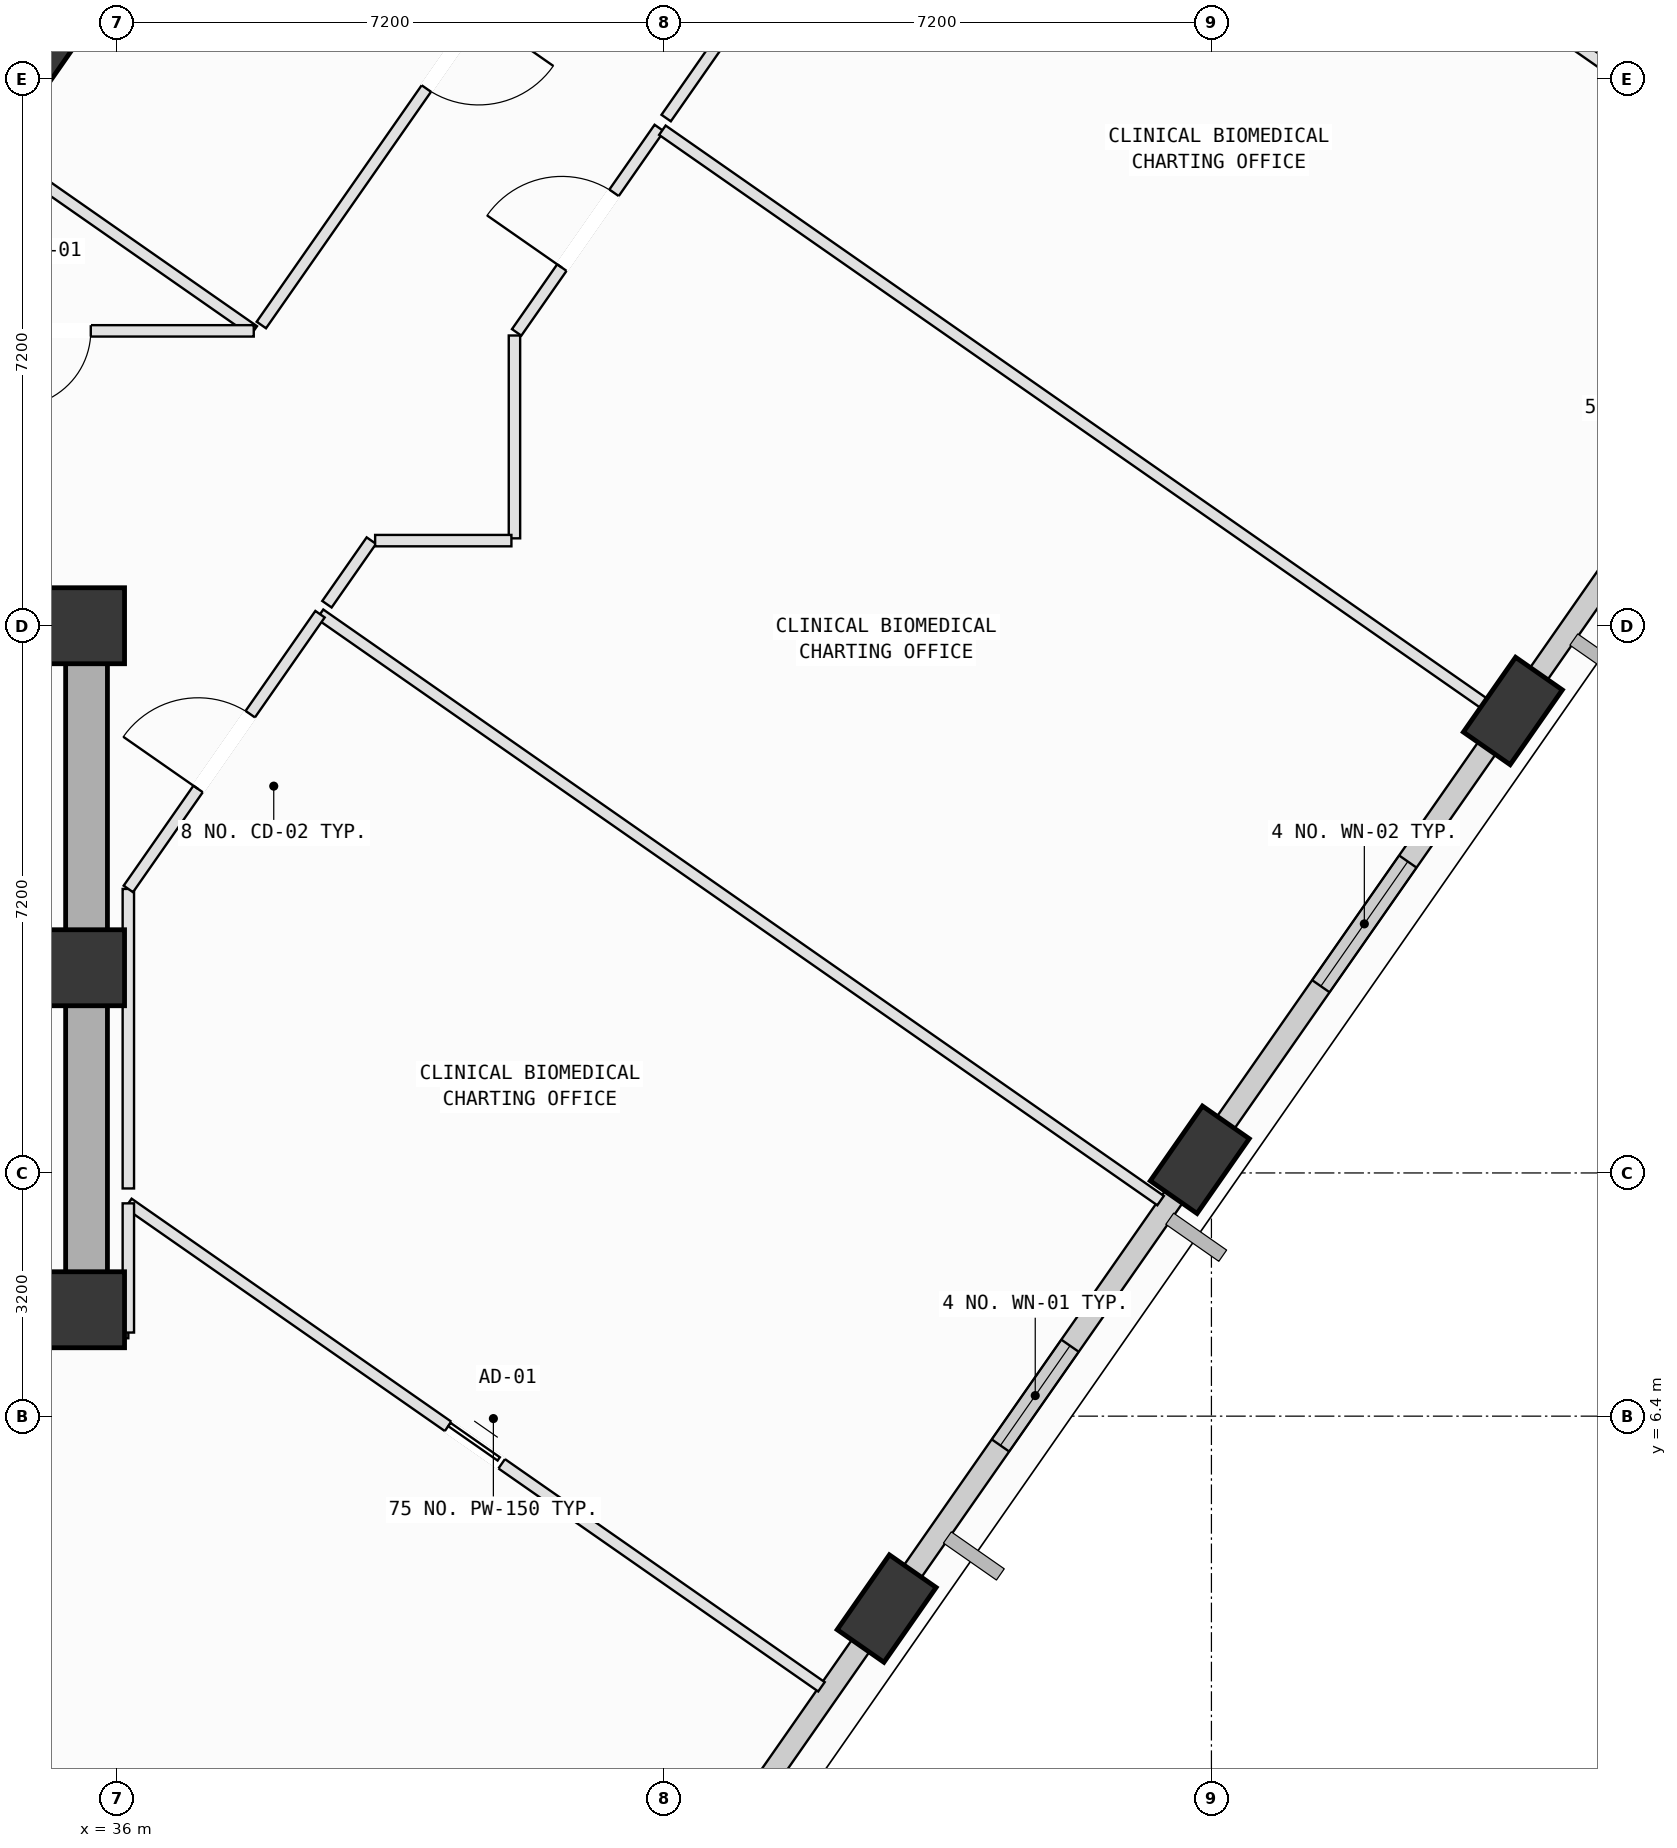
"""IFC4 building model, lengths in metres.
Left out: names, types, materials, properties, quantities, classifications, styles, units other than length and angle.
Written with IfcOpenShell. Run it as: python <this file> out.ifc"""

import sys

from ifc_helpers import new_model, si_unit, direction, frame, frame_2d, origin, origin_2d, place, context, subcontext, project, spatial, rectangle, extrude, element, fill, save


model = new_model("IFC4")
c1 = context("Model", 3, precision=1e-05, world=origin(), true_north=direction((0.0, 1.0)))
c2 = subcontext(c1, "Body", "Model", "MODEL_VIEW")
j1 = project(units=[si_unit("LENGTHUNIT", "METRE"), si_unit("PLANEANGLEUNIT", "RADIAN")], contexts=[c1])
p1 = place(None, origin())
s1 = spatial("IfcSite", under=j1, at=p1, CompositionType="ELEMENT")
p2 = place(p1, origin())
s2 = spatial("IfcBuilding", under=s1, at=p2, CompositionType="ELEMENT")
p3 = place(p2, frame((0.0, 0.0, 259.2)))
s3 = spatial("IfcBuildingStorey", under=s2, at=p3, CompositionType="ELEMENT", Elevation=259.2)
for number, where, z_axis, x_axis in (
    (1, (35.6, 7.8, 0.0), (0.0, 0.0, 1.0), (1.0, 0.0, 0.0)),
    (2, (35.6, 12.3, 0.0), (0.0, 0.0, 1.0), (1.0, 0.0, 0.0)),
    (3, (35.6, 16.8, 0.0), (0.0, 0.0, 1.0), (1.0, 0.0, 0.0)),
):
    element("IfcColumn", number, at=place(p3, frame(where, z_axis=z_axis, x_axis=x_axis)), inside=s3, PredefinedType="COLUMN", context=c2, shape_type="SweptSolid", body=[
        extrude(rectangle(XDim=1.0, YDim=1.0, at=origin_2d()), origin(), (0.0, 0.0, 1.0), 4.0),
    ])
p4 = place(p3, frame((46.127, 3.868, 0.002), z_axis=(0.085884033483, 0.052332733779, 0.994929755193), x_axis=(-0.9945362428, 0.063984080807, 0.082484538915)))
e4 = element("IfcColumn", 4, at=p4, inside=s3, PredefinedType="COLUMN", context=c2, shape_type="SweptSolid", body=[
    extrude(rectangle(XDim=1.2, YDim=0.75, at=origin_2d()), origin(), (0.0, 0.0, 1.0), 4.017),
])
p5 = place(p3, frame((50.247, 9.773, 0.002), z_axis=(0.061437147867, 0.069223241854, 0.995707597465), x_axis=(-0.969991349741, -0.230986175775, 0.075908945645)))
e5 = element("IfcColumn", 5, at=p5, inside=s3, PredefinedType="COLUMN", context=c2, shape_type="SweptSolid", body=[
    extrude(rectangle(XDim=1.2, YDim=0.75, at=origin_2d()), origin(), (0.0, 0.0, 1.0), 4.014),
])
p6 = place(p3, frame((54.366, 15.678, 0.002), z_axis=(0.03691932488, 0.086063994572, 0.995605319536), x_axis=(-0.847717972031, -0.524857195054, 0.076806019917)))
e6 = element("IfcColumn", 6, at=p6, inside=s3, PredefinedType="COLUMN", context=c2, shape_type="SweptSolid", body=[
    extrude(rectangle(XDim=1.2, YDim=0.75, at=origin_2d()), origin(), (0.0, 0.0, 1.0), 4.014),
])
p7 = place(p3, frame((34.936, 24.356, 0.002), z_axis=(0.001832701206, 0.005559193659, 0.999982868139), x_axis=(-0.800160526924, -0.599766691213, 0.004800756595)))
e7 = element("IfcColumn", 7, at=p7, inside=s3, PredefinedType="COLUMN", context=c2, shape_type="SweptSolid", body=[
    extrude(rectangle(XDim=1.2, YDim=0.75, at=origin_2d()), origin(), (0.0, 0.0, 1.0), 3.996),
])
p8 = place(p3, frame((46.01, 3.701, 0.0), z_axis=(0.0, 0.0, 1.0), x_axis=(-0.572138298293, -0.820157160321, 0.0)))
e8 = element("IfcWall", 8, at=p8, inside=s3, PredefinedType="SOLIDWALL", context=c2, shape_type="SweptSolid", body=[
    extrude(rectangle(XDim=6.439, YDim=0.28, at=frame_2d((3.219, 0.0))), origin(), (0.0, 0.0, 1.0), 3.265),
])
p9 = place(p8, frame((3.283, 0.0, 0.75)))
e9 = element("IfcOpeningElement", 9, at=p9, cuts=e8, PredefinedType="OPENING", context=c2, shape_type="SweptSolid", body=[
    extrude(rectangle(XDim=1.2, YDim=1.75, at=frame_2d((0.6, 0.875))), frame((0.0, 0.15, 0.0), z_axis=(0.0, -1.0, 0.0), x_axis=(1.0, 0.0, 0.0)), (0.0, 0.0, 1.0), 0.3),
])
p10 = place(p3, frame((50.125, 9.599, 0.0), z_axis=(0.0, 0.0, 1.0), x_axis=(-0.572145868794, -0.820151879119, 0.0)))
e10 = element("IfcWall", 10, at=p10, inside=s3, PredefinedType="SOLIDWALL", context=c2, shape_type="SweptSolid", body=[
    extrude(rectangle(XDim=6.414, YDim=0.28, at=frame_2d((3.207, 0.0))), origin(), (0.0, 0.0, 1.0), 3.265),
])
p11 = place(p10, frame((2.771, 0.0, 0.75)))
e11 = element("IfcOpeningElement", 11, at=p11, cuts=e10, PredefinedType="OPENING", context=c2, shape_type="SweptSolid", body=[
    extrude(rectangle(XDim=1.6, YDim=1.95, at=frame_2d((0.8, 0.975))), frame((0.0, 0.15, 0.0), z_axis=(0.0, -1.0, 0.0), x_axis=(1.0, 0.0, 0.0)), (0.0, 0.0, 1.0), 0.3),
])
p12 = place(p3, frame((54.245, 15.505, 0.0), z_axis=(0.0, 0.0, 1.0), x_axis=(-0.572154773517, -0.820145667026, 0.0)))
e12 = element("IfcWall", 12, at=p12, inside=s3, PredefinedType="SOLIDWALL", context=c2, shape_type="SweptSolid", body=[
    extrude(rectangle(XDim=6.407, YDim=0.28, at=frame_2d((3.204, 0.0))), origin(), (0.0, 0.0, 1.0), 3.265),
])
p13 = place(p12, frame((2.204, 0.0, 0.75)))
e13 = element("IfcOpeningElement", 13, at=p13, cuts=e12, PredefinedType="OPENING", context=c2, shape_type="SweptSolid", body=[
    extrude(rectangle(XDim=2.0, YDim=1.95, at=frame_2d((1.0, 0.975))), frame((0.0, 0.15, 0.0), z_axis=(0.0, -1.0, 0.0), x_axis=(1.0, 0.0, 0.0)), (0.0, 0.0, 1.0), 0.3),
])
p14 = place(p3, frame((58.37, 21.418, 0.0), z_axis=(0.0, 0.0, 1.0), x_axis=(-0.572149467016, -0.820149368953, 0.0)))
e14 = element("IfcWall", 14, at=p14, inside=s3, PredefinedType="SOLIDWALL", context=c2, shape_type="SweptSolid", body=[
    extrude(rectangle(XDim=6.418, YDim=0.28, at=frame_2d((3.209, 0.0))), origin(), (0.0, 0.0, 1.0), 3.265),
])
p15 = place(p14, frame((2.512, 0.0, 0.75)))
e15 = element("IfcOpeningElement", 15, at=p15, cuts=e14, PredefinedType="OPENING", context=c2, shape_type="SweptSolid", body=[
    extrude(rectangle(XDim=1.4, YDim=1.85, at=frame_2d((0.7, 0.925))), frame((0.0, 0.15, 0.0), z_axis=(0.0, -1.0, 0.0), x_axis=(1.0, 0.0, 0.0)), (0.0, 0.0, 1.0), 0.3),
])
p16 = place(p14, frame((0.494, 0.0, 0.75)))
e16 = element("IfcOpeningElement", 16, at=p16, cuts=e14, PredefinedType="OPENING", context=c2, shape_type="SweptSolid", body=[
    extrude(rectangle(XDim=1.4, YDim=1.85, at=frame_2d((0.7, 0.925))), frame((0.0, 0.15, 0.0), z_axis=(0.0, -1.0, 0.0), x_axis=(1.0, 0.0, 0.0)), (0.0, 0.0, 1.0), 0.3),
])
p17 = place(p3, frame((24.8, 7.8, 0.0), z_axis=(0.0, 0.0, 1.0), x_axis=(1.0, 0.0, 0.0)))
e17 = element("IfcWall", 17, at=p17, inside=s3, PredefinedType="SHEAR", context=c2, shape_type="SweptSolid", body=[
    extrude(rectangle(XDim=10.8, YDim=0.55, at=frame_2d((5.4, 0.0))), origin(), (0.0, 0.0, 1.0), 3.78),
])
p18 = place(p3, frame((35.6, 7.8, 0.0), z_axis=(0.0, 0.0, 1.0), x_axis=(0.0, 1.0, 0.0)))
e18 = element("IfcWall", 18, at=p18, inside=s3, PredefinedType="SHEAR", context=c2, shape_type="SweptSolid", body=[
    extrude(rectangle(XDim=9.0, YDim=0.55, at=frame_2d((4.5, 0.0))), origin(), (0.0, 0.0, 1.0), 3.78),
])
p19 = place(p3, frame((36.15, 9.2, 0.0), z_axis=(0.0, 0.0, 1.0), x_axis=(0.820183982528, -0.572099846883, 0.0)))
e19 = element("IfcWall", 19, at=p19, inside=s3, PredefinedType="PARTITIONING", context=c2, shape_type="SweptSolid", body=[
    extrude(rectangle(XDim=11.118, YDim=0.15, at=frame_2d((5.559, 0.0))), origin(), (0.0, 0.0, 1.0), 3.165),
])
p20 = place(p19, frame((5.129, 0.0, 0.0)))
e20 = element("IfcOpeningElement", 20, at=p20, cuts=e19, PredefinedType="OPENING", context=c2, shape_type="SweptSolid", body=[
    extrude(rectangle(XDim=0.86, YDim=2.06, at=frame_2d((0.43, 1.03))), frame((0.0, 0.085, 0.0), z_axis=(0.0, -1.0, 0.0), x_axis=(1.0, 0.0, 0.0)), (0.0, 0.0, 1.0), 0.17),
])
p21 = place(p3, frame((40.898, -3.426, 0.0), z_axis=(0.0, 0.0, 1.0), x_axis=(-0.820175590709, 0.572111877525, 0.0)))
e21 = element("IfcWall", 21, at=p21, inside=s3, PredefinedType="PARTITIONING", context=c2, shape_type="SweptSolid", body=[
    extrude(rectangle(XDim=13.585, YDim=0.15, at=frame_2d((6.792, 0.0))), origin(), (0.0, 0.0, 1.0), 3.78),
])
p22 = place(p3, frame((35.6, 7.5, 0.0), z_axis=(0.0, 0.0, 1.0), x_axis=(1.0, 0.0, 0.0)))
e22 = element("IfcWall", 22, at=p22, inside=s3, PredefinedType="PARTITIONING", context=c2, shape_type="SweptSolid", body=[
    extrude(rectangle(XDim=0.55, YDim=0.15, at=frame_2d((0.275, 0.0))), origin(), (0.0, 0.0, 1.0), 3.165),
])
p23 = place(p3, frame((36.15, 7.5, 0.0), z_axis=(0.0, 0.0, 1.0), x_axis=(0.0, 1.0, 0.0)))
e23 = element("IfcWall", 23, at=p23, inside=s3, PredefinedType="PARTITIONING", context=c2, shape_type="SweptSolid", body=[
    extrude(rectangle(XDim=1.7, YDim=0.15, at=frame_2d((0.85, 0.0))), origin(), (0.0, 0.0, 1.0), 3.78),
])
p24 = place(p3, frame((38.672, 16.952, 0.0), z_axis=(0.0, 0.0, 1.0), x_axis=(0.820114703908, -0.57219915452, 0.0)))
e24 = element("IfcWall", 24, at=p24, inside=s3, PredefinedType="PARTITIONING", context=c2, shape_type="SweptSolid", body=[
    extrude(rectangle(XDim=13.485, YDim=0.15, at=frame_2d((6.742, 0.0))), origin(), (0.0, 0.0, 1.0), 3.78),
])
p25 = place(p3, frame((46.644, 4.208, 0.0), z_axis=(0.0, 0.0, 1.0), x_axis=(-0.571588007993, -0.820540766274, 0.0)))
e25 = element("IfcWall", 25, at=p25, inside=s3, PredefinedType="PARTITIONING", context=c2, shape_type="SweptSolid", body=[
    extrude(rectangle(XDim=0.779, YDim=0.15, at=frame_2d((0.389, 0.0))), origin(), (0.0, 0.0, 1.0), 3.265),
])
p26 = place(p3, frame((36.15, 9.396, 0.0), z_axis=(0.0, 0.0, 1.0), x_axis=(0.0, 1.0, 0.0)))
e26 = element("IfcWall", 26, at=p26, inside=s3, PredefinedType="PARTITIONING", context=c2, shape_type="SweptSolid", body=[
    extrude(rectangle(XDim=3.941, YDim=0.15, at=frame_2d((1.97, 0.0))), origin(), (0.0, 0.0, 1.0), 3.78),
])
p27 = place(p3, frame((36.15, 13.337, 0.0), z_axis=(0.0, 0.0, 1.0), x_axis=(0.572201522226, 0.82011305194, 0.0)))
e27 = element("IfcWall", 27, at=p27, inside=s3, PredefinedType="PARTITIONING", context=c2, shape_type="SweptSolid", body=[
    extrude(rectangle(XDim=4.408, YDim=0.15, at=frame_2d((2.204, 0.0))), origin(), (0.0, 0.0, 1.0), 3.78),
])
p28 = place(p27, frame((1.604, 0.0, 0.0)))
e28 = element("IfcOpeningElement", 28, at=p28, cuts=e27, PredefinedType="OPENING", context=c2, shape_type="SweptSolid", body=[
    extrude(rectangle(XDim=1.2, YDim=2.15, at=frame_2d((0.6, 1.075))), frame((0.0, 0.085, 0.0), z_axis=(0.0, -1.0, 0.0), x_axis=(1.0, 0.0, 0.0)), (0.0, 0.0, 1.0), 0.17),
])
p29 = place(p3, frame((41.23, 17.95, 0.0), z_axis=(0.0, 0.0, 1.0), x_axis=(0.0, 1.0, 0.0)))
e29 = element("IfcWall", 29, at=p29, inside=s3, PredefinedType="PARTITIONING", context=c2, shape_type="SweptSolid", body=[
    extrude(rectangle(XDim=2.669, YDim=0.15, at=frame_2d((1.334, 0.0))), origin(), (0.0, 0.0, 1.0), 3.78),
])
p30 = place(p3, frame((41.259, 20.66, 0.0), z_axis=(0.0, 0.0, 1.0), x_axis=(0.572137337348, 0.820157830672, 0.0)))
e30 = element("IfcWall", 30, at=p30, inside=s3, PredefinedType="PARTITIONING", context=c2, shape_type="SweptSolid", body=[
    extrude(rectangle(XDim=3.279, YDim=0.15, at=frame_2d((1.639, 0.0))), origin(), (0.0, 0.0, 1.0), 3.78),
])
p31 = place(p30, frame((1.039, 0.0, 0.0)))
e31 = element("IfcOpeningElement", 31, at=p31, cuts=e30, PredefinedType="OPENING", context=c2, shape_type="SweptSolid", body=[
    extrude(rectangle(XDim=1.2, YDim=2.15, at=frame_2d((0.6, 1.075))), frame((0.0, 0.085, 0.0), z_axis=(0.0, -1.0, 0.0), x_axis=(1.0, 0.0, 0.0)), (0.0, 0.0, 1.0), 0.17),
])
p32 = place(p3, frame((43.176, 23.32, 0.0), z_axis=(0.0, 0.0, 1.0), x_axis=(0.820147534675, -0.572152096358, 0.0)))
e32 = element("IfcWall", 32, at=p32, inside=s3, PredefinedType="PARTITIONING", context=c2, shape_type="SweptSolid", body=[
    extrude(rectangle(XDim=13.463, YDim=0.15, at=frame_2d((6.732, 0.0))), origin(), (0.0, 0.0, 1.0), 3.78),
])
p33 = place(p3, frame((50.768, 10.119, 0.0), z_axis=(0.0, 0.0, 1.0), x_axis=(-0.572181596024, -0.820126954301, 0.0)))
e33 = element("IfcWall", 33, at=p33, inside=s3, PredefinedType="PARTITIONING", context=c2, shape_type="SweptSolid", body=[
    extrude(rectangle(XDim=0.794, YDim=0.15, at=frame_2d((0.397, 0.0))), origin(), (0.0, 0.0, 1.0), 3.265),
])
p34 = place(p3, frame((38.763, 17.083, 0.0), z_axis=(0.0, 0.0, 1.0), x_axis=(0.572241467614, 0.820085180175, 0.0)))
e34 = element("IfcWall", 34, at=p34, inside=s3, PredefinedType="PARTITIONING", context=c2, shape_type="SweptSolid", body=[
    extrude(rectangle(XDim=1.021, YDim=0.15, at=frame_2d((0.51, 0.0))), origin(), (0.0, 0.0, 1.0), 3.78),
])
p35 = place(p3, frame((39.397, 17.92, 0.0), z_axis=(0.0, 0.0, 1.0), x_axis=(1.0, 0.0, 0.0)))
e35 = element("IfcWall", 35, at=p35, inside=s3, PredefinedType="PARTITIONING", context=c2, shape_type="SweptSolid", body=[
    extrude(rectangle(XDim=1.793, YDim=0.15, at=frame_2d((0.896, 0.0))), origin(), (0.0, 0.0, 1.0), 3.78),
])
p36 = place(p3, frame((43.226, 23.48, 0.0), z_axis=(0.0, 0.0, 1.0), x_axis=(0.572106115417, 0.820179610026, 0.0)))
e36 = element("IfcWall", 36, at=p36, inside=s3, PredefinedType="PARTITIONING", context=c2, shape_type="SweptSolid", body=[
    extrude(rectangle(XDim=7.64, YDim=0.15, at=frame_2d((3.82, 0.0))), origin(), (0.0, 0.0, 1.0), 3.78),
])
p37 = place(p36, frame((3.22, 0.0, 0.0)))
e37 = element("IfcOpeningElement", 37, at=p37, cuts=e36, PredefinedType="OPENING", context=c2, shape_type="SweptSolid", body=[
    extrude(rectangle(XDim=1.2, YDim=2.15, at=frame_2d((0.6, 1.075))), frame((0.0, 0.085, 0.0), z_axis=(0.0, -1.0, 0.0), x_axis=(1.0, 0.0, 0.0)), (0.0, 0.0, 1.0), 0.17),
])
p38 = place(p3, frame((47.597, 29.746, 0.0), z_axis=(0.0, 0.0, 1.0), x_axis=(0.820150255488, -0.572148196207, 0.0)))
e38 = element("IfcWall", 38, at=p38, inside=s3, PredefinedType="PARTITIONING", context=c2, shape_type="SweptSolid", body=[
    extrude(rectangle(XDim=13.149, YDim=0.15, at=frame_2d((6.574, 0.0))), origin(), (0.0, 0.0, 1.0), 3.78),
])
p39 = place(p3, frame((54.887, 16.022, 0.0), z_axis=(0.0, 0.0, 1.0), x_axis=(-0.572635559693, -0.819810048593, 0.0)))
e39 = element("IfcWall", 39, at=p39, inside=s3, PredefinedType="PARTITIONING", context=c2, shape_type="SweptSolid", body=[
    extrude(rectangle(XDim=0.555, YDim=0.15, at=frame_2d((0.278, 0.0))), origin(), (0.0, 0.0, 1.0), 3.265),
])
p40 = place(p3, frame((34.243, 23.162, 0.0), z_axis=(0.0, 0.0, 1.0), x_axis=(0.820077197348, -0.572252907717, 0.0)))
e40 = element("IfcWall", 40, at=p40, inside=s3, PredefinedType="PARTITIONING", context=c2, shape_type="SweptSolid", body=[
    extrude(rectangle(XDim=4.338, YDim=0.15, at=frame_2d((2.169, 0.0))), origin(), (0.0, 0.0, 1.0), 3.78),
])
p41 = place(p3, frame((37.8, 20.68, 0.0), z_axis=(0.0, 0.0, 1.0), x_axis=(-1.0, 0.0, 0.0)))
e41 = element("IfcWall", 41, at=p41, inside=s3, PredefinedType="PARTITIONING", context=c2, shape_type="SweptSolid", body=[
    extrude(rectangle(XDim=5.288, YDim=0.15, at=frame_2d((2.644, 0.0))), origin(), (0.0, 0.0, 1.0), 3.415),
])
p42 = place(p41, frame((2.144, 0.0, 0.0)))
e42 = element("IfcOpeningElement", 42, at=p42, cuts=e41, PredefinedType="OPENING", context=c2, shape_type="SweptSolid", body=[
    extrude(rectangle(XDim=1.0, YDim=2.12, at=frame_2d((0.5, 1.06))), frame((0.0, 0.085, 0.0), z_axis=(0.0, -1.0, 0.0), x_axis=(1.0, 0.0, 0.0)), (0.0, 0.0, 1.0), 0.17),
])
p43 = place(p3, frame((42.928, 27.964, 0.0), z_axis=(0.0, 0.0, 1.0), x_axis=(-0.572175077439, -0.820131502113, 0.0)))
e43 = element("IfcWall", 43, at=p43, inside=s3, PredefinedType="PARTITIONING", context=c2, shape_type="SweptSolid", body=[
    extrude(rectangle(XDim=8.788, YDim=0.15, at=frame_2d((4.394, 0.0))), origin(), (0.0, 0.0, 1.0), 3.78),
])
p44 = place(p43, frame((3.794, 0.0, 0.0)))
e44 = element("IfcOpeningElement", 44, at=p44, cuts=e43, PredefinedType="OPENING", context=c2, shape_type="SweptSolid", body=[
    extrude(rectangle(XDim=1.2, YDim=2.15, at=frame_2d((0.6, 1.075))), frame((0.0, 0.085, 0.0), z_axis=(0.0, -1.0, 0.0), x_axis=(1.0, 0.0, 0.0)), (0.0, 0.0, 1.0), 0.17),
])
p45 = place(p3, frame((33.766, 23.64, 0.0), z_axis=(0.0, 0.0, 1.0), x_axis=(0.572104245641, 0.820180914262, 0.0)))
e45 = element("IfcWall", 45, at=p45, inside=s3, PredefinedType="PARTITIONING", context=c2, shape_type="SweptSolid", body=[
    extrude(rectangle(XDim=8.788, YDim=0.15, at=frame_2d((4.394, 0.0))), origin(), (0.0, 0.0, 1.0), 3.265),
])
p46 = place(p11, origin())
e46 = element("IfcWindow", 46, at=p46, inside=s3, PartitioningType="SINGLE_PANEL", PredefinedType="WINDOW", context=c2, shape_type="SweptSolid", body=[
    extrude(rectangle(XDim=1.6, YDim=1.95, at=frame_2d((0.8, 0.975))), frame((0.0, 0.03, 0.0), z_axis=(0.0, -1.0, 0.0), x_axis=(1.0, 0.0, 0.0)), (0.0, 0.0, 1.0), 0.06),
])
fill(e11, e46)
p47 = place(p13, origin())
e47 = element("IfcWindow", 47, at=p47, inside=s3, PartitioningType="SINGLE_PANEL", PredefinedType="WINDOW", context=c2, shape_type="SweptSolid", body=[
    extrude(rectangle(XDim=2.0, YDim=1.95, at=frame_2d((1.0, 0.975))), frame((0.0, 0.03, 0.0), z_axis=(0.0, -1.0, 0.0), x_axis=(1.0, 0.0, 0.0)), (0.0, 0.0, 1.0), 0.06),
])
fill(e13, e47)
p48 = place(p28, origin())
e48 = element("IfcDoor", 48, at=p48, inside=s3, OperationType="SINGLE_SWING_LEFT", PredefinedType="DOOR", context=c2, shape_type="SweptSolid", body=[
    extrude(rectangle(XDim=1.2, YDim=2.15, at=frame_2d((0.6, 1.075))), frame((0.0, 0.025, 0.0), z_axis=(0.0, -1.0, 0.0), x_axis=(1.0, 0.0, 0.0)), (0.0, 0.0, 1.0), 0.05),
])
fill(e28, e48)
p49 = place(p31, origin())
e49 = element("IfcDoor", 49, at=p49, inside=s3, OperationType="SINGLE_SWING_LEFT", PredefinedType="DOOR", context=c2, shape_type="SweptSolid", body=[
    extrude(rectangle(XDim=1.2, YDim=2.15, at=frame_2d((0.6, 1.075))), frame((0.0, 0.025, 0.0), z_axis=(0.0, -1.0, 0.0), x_axis=(1.0, 0.0, 0.0)), (0.0, 0.0, 1.0), 0.05),
])
fill(e31, e49)
p50 = place(p42, origin())
e50 = element("IfcDoor", 50, at=p50, inside=s3, OperationType="SINGLE_SWING_RIGHT", PredefinedType="DOOR", context=c2, shape_type="SweptSolid", body=[
    extrude(rectangle(XDim=1.0, YDim=2.12, at=frame_2d((0.5, 1.06))), frame((0.0, 0.025, 0.0), z_axis=(0.0, -1.0, 0.0), x_axis=(1.0, 0.0, 0.0)), (0.0, 0.0, 1.0), 0.05),
])
fill(e42, e50)
p51 = place(p44, origin())
e51 = element("IfcDoor", 51, at=p51, inside=s3, OperationType="SINGLE_SWING_LEFT", PredefinedType="DOOR", context=c2, shape_type="SweptSolid", body=[
    extrude(rectangle(XDim=1.2, YDim=2.15, at=frame_2d((0.6, 1.075))), frame((0.0, 0.025, 0.0), z_axis=(0.0, -1.0, 0.0), x_axis=(1.0, 0.0, 0.0)), (0.0, 0.0, 1.0), 0.05),
])
fill(e44, e51)
p52 = place(p20, origin())
e52 = element("IfcDoor", 52, at=p52, inside=s3, OperationType="SLIDING_TO_LEFT", PredefinedType="DOOR", context=c2, shape_type="SweptSolid", body=[
    extrude(rectangle(XDim=0.86, YDim=2.06, at=frame_2d((0.43, 1.03))), frame((0.0, 0.025, 0.0), z_axis=(0.0, -1.0, 0.0), x_axis=(1.0, 0.0, 0.0)), (0.0, 0.0, 1.0), 0.05),
])
fill(e20, e52)
save(model, sys.argv[1])
